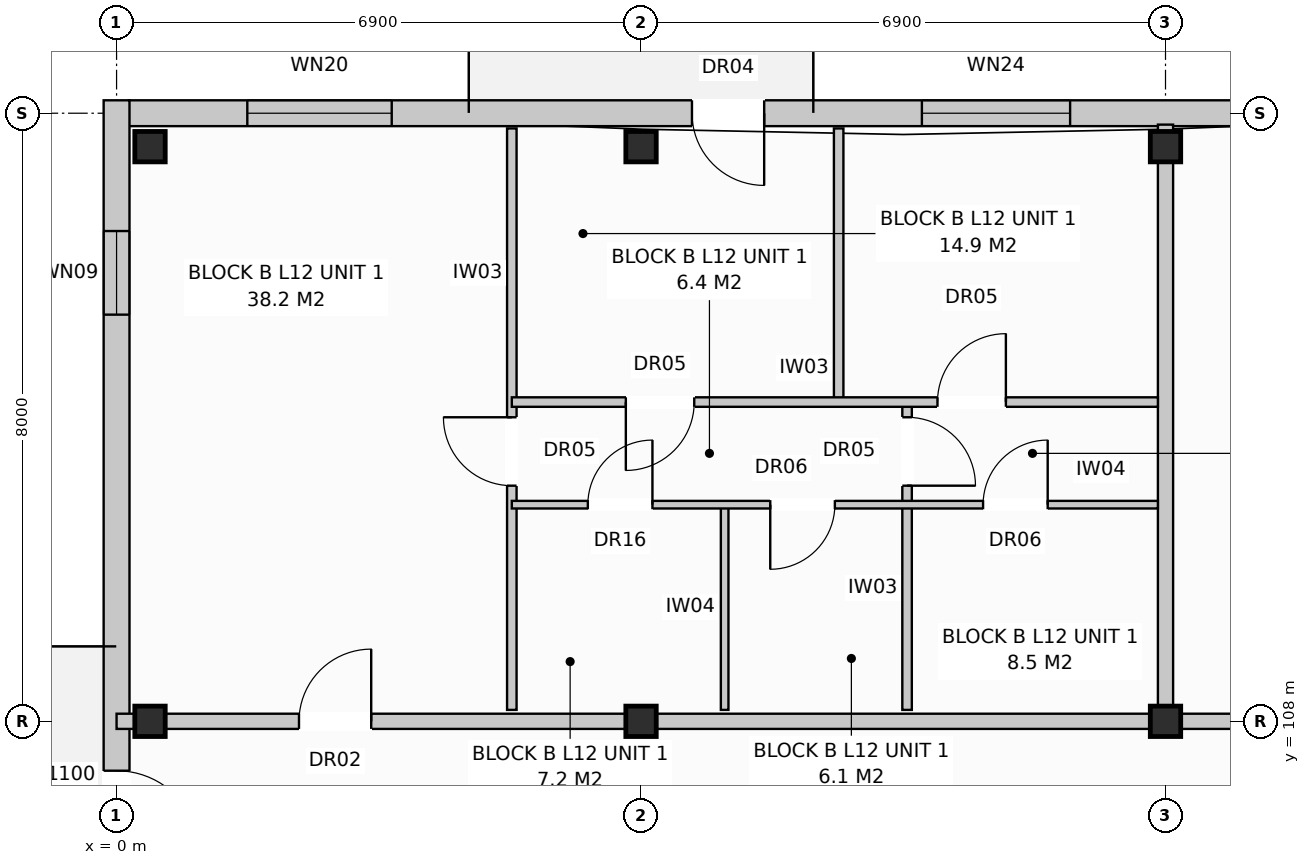
"""IFC4 building model, lengths in metres.
Left out: names, types, materials, properties, quantities, classifications, styles, units other than length and angle.
Written with IfcOpenShell. Run it as: python <this file> out.ifc"""

import sys

from ifc_helpers import new_model, si_unit, direction, frame, frame_2d, origin, origin_with_axes, origin_2d, place, context, subcontext, project, spatial, rectangle, extrude, element, fill, save


model = new_model("IFC4")
c1 = context("Model", 3, precision=1e-05, world=origin(), true_north=direction((0.0, 1.0)))
c2 = subcontext(c1, "Body", "Model", "MODEL_VIEW")
j1 = project(units=[si_unit("LENGTHUNIT", "METRE"), si_unit("PLANEANGLEUNIT", "RADIAN")], contexts=[c1])
p1 = place(None, origin())
s1 = spatial("IfcSite", under=j1, at=p1, CompositionType="ELEMENT")
p2 = place(p1, origin())
s2 = spatial("IfcBuilding", under=s1, at=p2, CompositionType="ELEMENT")
p3 = place(p2, frame((0.0, 0.0, 40.0)))
s3 = spatial("IfcBuildingStorey", under=s2, at=p3, CompositionType="ELEMENT", Elevation=40.0)
for number, where, z_axis, x_axis in (
    (1, (0.44, 108.0, 0.0), (0.0, 0.0, 1.0), (1.0, 0.0, 0.0)),
    (2, (0.44, 115.56, 0.0), (0.0, 0.0, 1.0), (1.0, 0.0, 0.0)),
    (3, (6.9, 108.0, 0.0), (0.0, 0.0, 1.0), (1.0, 0.0, 0.0)),
    (4, (6.9, 115.56, 0.0), (0.0, 0.0, 1.0), (1.0, 0.0, 0.0)),
    (5, (13.8, 108.0, 0.0), (0.0, 0.0, 1.0), (1.0, 0.0, 0.0)),
    (6, (13.8, 115.56, 0.0), (0.0, 0.0, 1.0), (1.0, 0.0, 0.0)),
):
    element("IfcColumn", number, at=place(p3, frame(where, z_axis=z_axis, x_axis=x_axis)), inside=s3, PredefinedType="COLUMN", context=c2, shape_type="SweptSolid", body=[
        extrude(rectangle(XDim=0.4, YDim=0.4, at=origin_2d()), origin(), (0.0, 0.0, 1.0), 3.2),
    ])
p4 = place(p3, frame((0.16, 116.0, 0.0), z_axis=(0.0, 0.0, 1.0), x_axis=(1.0, 0.0, 0.0)))
e7 = element("IfcWall", 7, at=p4, inside=s3, PredefinedType="STANDARD", context=c2, shape_type="SweptSolid", body=[
    extrude(rectangle(XDim=41.08, YDim=0.34, at=frame_2d((20.54, 0.0))), origin(), (0.0, 0.0, 1.0), 2.91),
])
p5 = place(p4, frame((7.41, 0.0, 0.0)))
e8 = element("IfcOpeningElement", 8, at=p5, cuts=e7, PredefinedType="OPENING", context=c2, shape_type="SweptSolid", body=[
    extrude(rectangle(XDim=0.95, YDim=2.1, at=frame_2d((0.475, 1.05))), frame((0.0, 0.182, 0.0), z_axis=(0.0, -1.0, 0.0), x_axis=(1.0, 0.0, 0.0)), (0.0, 0.0, 1.0), 0.364),
])
p6 = place(p4, frame((18.744, 0.0, 0.0)))
e9 = element("IfcOpeningElement", 9, at=p6, cuts=e7, PredefinedType="OPENING", context=c2, shape_type="SweptSolid", body=[
    extrude(rectangle(XDim=0.95, YDim=2.1, at=frame_2d((0.475, 1.05))), frame((0.0, 0.182, 0.0), z_axis=(0.0, -1.0, 0.0), x_axis=(1.0, 0.0, 0.0)), (0.0, 0.0, 1.0), 0.364),
])
p7 = place(p4, frame((32.694, 0.0, 0.0)))
e10 = element("IfcOpeningElement", 10, at=p7, cuts=e7, PredefinedType="OPENING", context=c2, shape_type="SweptSolid", body=[
    extrude(rectangle(XDim=0.95, YDim=2.1, at=frame_2d((0.475, 1.05))), frame((0.0, 0.182, 0.0), z_axis=(0.0, -1.0, 0.0), x_axis=(1.0, 0.0, 0.0)), (0.0, 0.0, 1.0), 0.364),
])
p8 = place(p4, frame((1.56, 0.0, 0.8)))
e11 = element("IfcOpeningElement", 11, at=p8, cuts=e7, PredefinedType="OPENING", context=c2, shape_type="SweptSolid", body=[
    extrude(rectangle(XDim=1.9, YDim=1.85, at=frame_2d((0.95, 0.925))), frame((0.0, 0.182, 0.0), z_axis=(0.0, -1.0, 0.0), x_axis=(1.0, 0.0, 0.0)), (0.0, 0.0, 1.0), 0.364),
])
p9 = place(p4, frame((10.435, 0.0, 0.8)))
e12 = element("IfcOpeningElement", 12, at=p9, cuts=e7, PredefinedType="OPENING", context=c2, shape_type="SweptSolid", body=[
    extrude(rectangle(XDim=1.95, YDim=1.65, at=frame_2d((0.975, 0.825))), frame((0.0, 0.182, 0.0), z_axis=(0.0, -1.0, 0.0), x_axis=(1.0, 0.0, 0.0)), (0.0, 0.0, 1.0), 0.364),
])
p10 = place(p4, frame((15.91, 0.0, 0.8)))
e13 = element("IfcOpeningElement", 13, at=p10, cuts=e7, PredefinedType="OPENING", context=c2, shape_type="SweptSolid", body=[
    extrude(rectangle(XDim=1.8, YDim=1.7, at=frame_2d((0.9, 0.85))), frame((0.0, 0.182, 0.0), z_axis=(0.0, -1.0, 0.0), x_axis=(1.0, 0.0, 0.0)), (0.0, 0.0, 1.0), 0.364),
])
p11 = place(p4, frame((21.96, 0.0, 0.72)))
e14 = element("IfcOpeningElement", 14, at=p11, cuts=e7, PredefinedType="OPENING", context=c2, shape_type="SweptSolid", body=[
    extrude(rectangle(XDim=1.1, YDim=1.5, at=frame_2d((0.55, 0.75))), frame((0.0, 0.182, 0.0), z_axis=(0.0, -1.0, 0.0), x_axis=(1.0, 0.0, 0.0)), (0.0, 0.0, 1.0), 0.364),
])
p12 = place(p4, frame((27.935, 0.0, 0.8)))
e15 = element("IfcOpeningElement", 15, at=p12, cuts=e7, PredefinedType="OPENING", context=c2, shape_type="SweptSolid", body=[
    extrude(rectangle(XDim=1.95, YDim=1.65, at=frame_2d((0.975, 0.825))), frame((0.0, 0.182, 0.0), z_axis=(0.0, -1.0, 0.0), x_axis=(1.0, 0.0, 0.0)), (0.0, 0.0, 1.0), 0.364),
])
p13 = place(p4, frame((30.81, 0.0, 0.85)))
e16 = element("IfcOpeningElement", 16, at=p13, cuts=e7, PredefinedType="OPENING", context=c2, shape_type="SweptSolid", body=[
    extrude(rectangle(XDim=1.5, YDim=1.65, at=frame_2d((0.75, 0.825))), frame((0.0, 0.182, 0.0), z_axis=(0.0, -1.0, 0.0), x_axis=(1.0, 0.0, 0.0)), (0.0, 0.0, 1.0), 0.364),
])
p14 = place(p4, frame((35.76, 0.0, 0.72)))
e17 = element("IfcOpeningElement", 17, at=p14, cuts=e7, PredefinedType="OPENING", context=c2, shape_type="SweptSolid", body=[
    extrude(rectangle(XDim=1.1, YDim=1.5, at=frame_2d((0.55, 0.75))), frame((0.0, 0.182, 0.0), z_axis=(0.0, -1.0, 0.0), x_axis=(1.0, 0.0, 0.0)), (0.0, 0.0, 1.0), 0.364),
])
p15 = place(p4, frame((38.525, 0.0, 0.8)))
e18 = element("IfcOpeningElement", 18, at=p15, cuts=e7, PredefinedType="OPENING", context=c2, shape_type="SweptSolid", body=[
    extrude(rectangle(XDim=1.95, YDim=1.65, at=frame_2d((0.975, 0.825))), frame((0.0, 0.182, 0.0), z_axis=(0.0, -1.0, 0.0), x_axis=(1.0, 0.0, 0.0)), (0.0, 0.0, 1.0), 0.364),
])
p16 = place(p3, frame((0.0, 97.43, 0.0), z_axis=(0.0, 0.0, 1.0), x_axis=(0.0, 1.0, 0.0)))
e19 = element("IfcWall", 19, at=p16, inside=s3, PredefinedType="STANDARD", context=c2, shape_type="SweptSolid", body=[
    extrude(rectangle(XDim=18.74, YDim=0.34, at=frame_2d((9.37, 0.0))), origin(), (0.0, 0.0, 1.0), 2.91),
])
p17 = place(p16, frame((8.82, 0.0, 0.0)))
e20 = element("IfcOpeningElement", 20, at=p17, cuts=e19, PredefinedType="OPENING", context=c2, shape_type="SweptSolid", body=[
    extrude(rectangle(XDim=1.1, YDim=2.1, at=frame_2d((0.55, 1.05))), frame((0.0, 0.182, 0.0), z_axis=(0.0, -1.0, 0.0), x_axis=(1.0, 0.0, 0.0)), (0.0, 0.0, 1.0), 0.364),
])
p18 = place(p16, frame((1.72, 0.0, 0.72)))
e21 = element("IfcOpeningElement", 21, at=p18, cuts=e19, PredefinedType="OPENING", context=c2, shape_type="SweptSolid", body=[
    extrude(rectangle(XDim=1.1, YDim=1.5, at=frame_2d((0.55, 0.75))), frame((0.0, 0.182, 0.0), z_axis=(0.0, -1.0, 0.0), x_axis=(1.0, 0.0, 0.0)), (0.0, 0.0, 1.0), 0.364),
])
p19 = place(p16, frame((15.92, 0.0, 0.72)))
e22 = element("IfcOpeningElement", 22, at=p19, cuts=e19, PredefinedType="OPENING", context=c2, shape_type="SweptSolid", body=[
    extrude(rectangle(XDim=1.1, YDim=1.5, at=frame_2d((0.55, 0.75))), frame((0.0, 0.182, 0.0), z_axis=(0.0, -1.0, 0.0), x_axis=(1.0, 0.0, 0.0)), (0.0, 0.0, 1.0), 0.364),
])
p20 = place(p3, frame((13.8, 108.15, 0.0), z_axis=(0.0, 0.0, 1.0), x_axis=(0.0, 1.0, 0.0)))
e23 = element("IfcWall", 23, at=p20, inside=s3, PredefinedType="PARTITIONING", context=c2, shape_type="SweptSolid", body=[
    extrude(rectangle(XDim=7.7, YDim=0.2, at=frame_2d((3.85, 0.0))), origin(), (0.0, 0.0, 1.0), 2.97),
])
p21 = place(p3, frame((0.0, 108.0, 0.0), z_axis=(0.0, 0.0, 1.0), x_axis=(1.0, 0.0, 0.0)))
e24 = element("IfcWall", 24, at=p21, inside=s3, PredefinedType="PARTITIONING", context=c2, shape_type="SweptSolid", body=[
    extrude(rectangle(XDim=13.8, YDim=0.2, at=frame_2d((6.9, 0.0))), origin(), (0.0, 0.0, 1.0), 2.35),
])
p22 = place(p21, frame((2.4, 0.0, 0.0)))
e25 = element("IfcOpeningElement", 25, at=p22, cuts=e24, PredefinedType="OPENING", context=c2, shape_type="SweptSolid", body=[
    extrude(rectangle(XDim=0.95, YDim=2.15, at=frame_2d((0.475, 1.075))), frame((0.0, 0.112, 0.0), z_axis=(0.0, -1.0, 0.0), x_axis=(1.0, 0.0, 0.0)), (0.0, 0.0, 1.0), 0.224),
])
p23 = place(p3, frame((5.2, 108.15, 0.0), z_axis=(0.0, 0.0, 1.0), x_axis=(0.0, 1.0, 0.0)))
e26 = element("IfcWall", 26, at=p23, inside=s3, PredefinedType="PARTITIONING", context=c2, shape_type="SweptSolid", body=[
    extrude(rectangle(XDim=7.65, YDim=0.125, at=frame_2d((3.825, 0.0))), origin(), (0.0, 0.0, 1.0), 2.97),
])
p24 = place(p23, frame((2.95, 0.0, 0.0)))
e27 = element("IfcOpeningElement", 27, at=p24, cuts=e26, PredefinedType="OPENING", context=c2, shape_type="SweptSolid", body=[
    extrude(rectangle(XDim=0.9, YDim=2.1, at=frame_2d((0.45, 1.05))), frame((0.0, 0.074, 0.0), z_axis=(0.0, -1.0, 0.0), x_axis=(1.0, 0.0, 0.0)), (0.0, 0.0, 1.0), 0.149),
])
p25 = place(p3, frame((8.0, 108.15, 0.0), z_axis=(0.0, 0.0, 1.0), x_axis=(0.0, 1.0, 0.0)))
e28 = element("IfcWall", 28, at=p25, inside=s3, PredefinedType="PARTITIONING", context=c2, shape_type="SweptSolid", body=[
    extrude(rectangle(XDim=2.7, YDim=0.1, at=frame_2d((1.35, 0.0))), origin(), (0.0, 0.0, 1.0), 2.59),
])
p26 = place(p3, frame((10.4, 108.15, 0.0), z_axis=(0.0, 0.0, 1.0), x_axis=(0.0, 1.0, 0.0)))
e29 = element("IfcWall", 29, at=p26, inside=s3, PredefinedType="PARTITIONING", context=c2, shape_type="SweptSolid", body=[
    extrude(rectangle(XDim=4.05, YDim=0.125, at=frame_2d((2.025, 0.0))), origin(), (0.0, 0.0, 1.0), 2.97),
])
p27 = place(p26, frame((2.95, 0.0, 0.0)))
e30 = element("IfcOpeningElement", 30, at=p27, cuts=e29, PredefinedType="OPENING", context=c2, shape_type="SweptSolid", body=[
    extrude(rectangle(XDim=0.9, YDim=2.1, at=frame_2d((0.45, 1.05))), frame((0.0, 0.074, 0.0), z_axis=(0.0, -1.0, 0.0), x_axis=(1.0, 0.0, 0.0)), (0.0, 0.0, 1.0), 0.149),
])
p28 = place(p3, frame((9.5, 112.2, 0.0), z_axis=(0.0, 0.0, 1.0), x_axis=(0.0, 1.0, 0.0)))
e31 = element("IfcWall", 31, at=p28, inside=s3, PredefinedType="PARTITIONING", context=c2, shape_type="SweptSolid", body=[
    extrude(rectangle(XDim=3.6, YDim=0.125, at=frame_2d((1.8, 0.0))), origin(), (0.0, 0.0, 1.0), 2.97),
])
p29 = place(p3, frame((5.2, 110.85, 0.0), z_axis=(0.0, 0.0, 1.0), x_axis=(1.0, 0.0, 0.0)))
e32 = element("IfcWall", 32, at=p29, inside=s3, PredefinedType="PARTITIONING", context=c2, shape_type="SweptSolid", body=[
    extrude(rectangle(XDim=8.5, YDim=0.1, at=frame_2d((4.25, 0.0))), origin(), (0.0, 0.0, 1.0), 2.97),
])
p30 = place(p29, frame((1.0, 0.0, 0.0)))
e33 = element("IfcOpeningElement", 33, at=p30, cuts=e32, PredefinedType="OPENING", context=c2, shape_type="SweptSolid", body=[
    extrude(rectangle(XDim=0.85, YDim=2.1, at=frame_2d((0.425, 1.05))), frame((0.0, 0.062, 0.0), z_axis=(0.0, -1.0, 0.0), x_axis=(1.0, 0.0, 0.0)), (0.0, 0.0, 1.0), 0.124),
])
p31 = place(p29, frame((3.4, 0.0, 0.0)))
e34 = element("IfcOpeningElement", 34, at=p31, cuts=e32, PredefinedType="OPENING", context=c2, shape_type="SweptSolid", body=[
    extrude(rectangle(XDim=0.85, YDim=2.05, at=frame_2d((0.425, 1.025))), frame((0.0, 0.062, 0.0), z_axis=(0.0, -1.0, 0.0), x_axis=(1.0, 0.0, 0.0)), (0.0, 0.0, 1.0), 0.124),
])
p32 = place(p29, frame((6.2, 0.0, 0.0)))
e35 = element("IfcOpeningElement", 35, at=p32, cuts=e32, PredefinedType="OPENING", context=c2, shape_type="SweptSolid", body=[
    extrude(rectangle(XDim=0.85, YDim=2.05, at=frame_2d((0.425, 1.025))), frame((0.0, 0.062, 0.0), z_axis=(0.0, -1.0, 0.0), x_axis=(1.0, 0.0, 0.0)), (0.0, 0.0, 1.0), 0.124),
])
p33 = place(p3, frame((5.2, 112.2, 0.0), z_axis=(0.0, 0.0, 1.0), x_axis=(1.0, 0.0, 0.0)))
e36 = element("IfcWall", 36, at=p33, inside=s3, PredefinedType="PARTITIONING", context=c2, shape_type="SweptSolid", body=[
    extrude(rectangle(XDim=8.5, YDim=0.125, at=frame_2d((4.25, 0.0))), origin(), (0.0, 0.0, 1.0), 2.97),
])
p34 = place(p33, frame((1.5, 0.0, 0.0)))
e37 = element("IfcOpeningElement", 37, at=p34, cuts=e36, PredefinedType="OPENING", context=c2, shape_type="SweptSolid", body=[
    extrude(rectangle(XDim=0.9, YDim=2.1, at=frame_2d((0.45, 1.05))), frame((0.0, 0.074, 0.0), z_axis=(0.0, -1.0, 0.0), x_axis=(1.0, 0.0, 0.0)), (0.0, 0.0, 1.0), 0.149),
])
p35 = place(p33, frame((5.6, 0.0, 0.0)))
e38 = element("IfcOpeningElement", 38, at=p35, cuts=e36, PredefinedType="OPENING", context=c2, shape_type="SweptSolid", body=[
    extrude(rectangle(XDim=0.9, YDim=2.1, at=frame_2d((0.45, 1.05))), frame((0.0, 0.074, 0.0), z_axis=(0.0, -1.0, 0.0), x_axis=(1.0, 0.0, 0.0)), (0.0, 0.0, 1.0), 0.149),
])
p36 = place(p3, frame((13.8, 108.0, 0.0), z_axis=(0.0, 0.0, 1.0), x_axis=(1.0, 0.0, 0.0)))
e39 = element("IfcWall", 39, at=p36, inside=s3, PredefinedType="PARTITIONING", context=c2, shape_type="SweptSolid", body=[
    extrude(rectangle(XDim=20.7, YDim=0.2, at=frame_2d((10.35, 0.0))), origin(), (0.0, 0.0, 1.0), 2.35),
])
p37 = place(p36, frame((2.4, 0.0, 0.0)))
e40 = element("IfcOpeningElement", 40, at=p37, cuts=e39, PredefinedType="OPENING", context=c2, shape_type="SweptSolid", body=[
    extrude(rectangle(XDim=0.95, YDim=2.15, at=frame_2d((0.475, 1.075))), frame((0.0, 0.112, 0.0), z_axis=(0.0, -1.0, 0.0), x_axis=(1.0, 0.0, 0.0)), (0.0, 0.0, 1.0), 0.224),
])
p38 = place(p5, frame((0.95, 0.0, 0.0), z_axis=(0.0, 0.0, 1.0), x_axis=(-1.0, 0.0, 0.0)))
e41 = element("IfcDoor", 41, at=p38, inside=s3, OperationType="SINGLE_SWING_RIGHT", PredefinedType="DOOR", context=c2, shape_type="SweptSolid", body=[
    extrude(rectangle(XDim=0.95, YDim=2.1, at=frame_2d((0.475, 1.05))), frame((0.0, 0.025, 0.0), z_axis=(0.0, -1.0, 0.0), x_axis=(1.0, 0.0, 0.0)), (0.0, 0.0, 1.0), 0.05),
])
fill(e8, e41)
p39 = place(p8, origin_with_axes())
e42 = element("IfcWindow", 42, at=p39, inside=s3, PartitioningType="SINGLE_PANEL", PredefinedType="WINDOW", context=c2, shape_type="SweptSolid", body=[
    extrude(rectangle(XDim=1.9, YDim=1.85, at=frame_2d((0.95, 0.925))), frame((0.0, 0.03, 0.0), z_axis=(0.0, -1.0, 0.0), x_axis=(1.0, 0.0, 0.0)), (0.0, 0.0, 1.0), 0.06),
])
fill(e11, e42)
p40 = place(p9, origin_with_axes())
e43 = element("IfcWindow", 43, at=p40, inside=s3, PartitioningType="SINGLE_PANEL", PredefinedType="WINDOW", context=c2, shape_type="SweptSolid", body=[
    extrude(rectangle(XDim=1.95, YDim=1.65, at=frame_2d((0.975, 0.825))), frame((0.0, 0.03, 0.0), z_axis=(0.0, -1.0, 0.0), x_axis=(1.0, 0.0, 0.0)), (0.0, 0.0, 1.0), 0.06),
])
fill(e12, e43)
p41 = place(p17, frame((1.1, 0.0, 0.0), z_axis=(0.0, 0.0, 1.0), x_axis=(-1.0, 0.0, 0.0)))
e44 = element("IfcDoor", 44, at=p41, inside=s3, OperationType="SINGLE_SWING_LEFT", PredefinedType="DOOR", context=c2, shape_type="SweptSolid", body=[
    extrude(rectangle(XDim=1.1, YDim=2.1, at=frame_2d((0.55, 1.05))), frame((0.0, 0.025, 0.0), z_axis=(0.0, -1.0, 0.0), x_axis=(1.0, 0.0, 0.0)), (0.0, 0.0, 1.0), 0.05),
])
fill(e20, e44)
p42 = place(p19, origin_with_axes())
e45 = element("IfcWindow", 45, at=p42, inside=s3, PartitioningType="SINGLE_PANEL", PredefinedType="WINDOW", context=c2, shape_type="SweptSolid", body=[
    extrude(rectangle(XDim=1.1, YDim=1.5, at=frame_2d((0.55, 0.75))), frame((0.0, 0.03, 0.0), z_axis=(0.0, -1.0, 0.0), x_axis=(1.0, 0.0, 0.0)), (0.0, 0.0, 1.0), 0.06),
])
fill(e22, e45)
p43 = place(p22, origin_with_axes())
e46 = element("IfcDoor", 46, at=p43, inside=s3, OperationType="SINGLE_SWING_RIGHT", PredefinedType="DOOR", context=c2, shape_type="SweptSolid", body=[
    extrude(rectangle(XDim=0.95, YDim=2.15, at=frame_2d((0.475, 1.075))), frame((0.0, 0.025, 0.0), z_axis=(0.0, -1.0, 0.0), x_axis=(1.0, 0.0, 0.0)), (0.0, 0.0, 1.0), 0.05),
])
fill(e25, e46)
p44 = place(p24, origin_with_axes())
e47 = element("IfcDoor", 47, at=p44, inside=s3, OperationType="SINGLE_SWING_RIGHT", PredefinedType="DOOR", context=c2, shape_type="SweptSolid", body=[
    extrude(rectangle(XDim=0.9, YDim=2.1, at=frame_2d((0.45, 1.05))), frame((0.0, 0.025, 0.0), z_axis=(0.0, -1.0, 0.0), x_axis=(1.0, 0.0, 0.0)), (0.0, 0.0, 1.0), 0.05),
])
fill(e27, e47)
p45 = place(p27, frame((0.9, 0.0, 0.0), z_axis=(0.0, 0.0, 1.0), x_axis=(-1.0, 0.0, 0.0)))
e48 = element("IfcDoor", 48, at=p45, inside=s3, OperationType="SINGLE_SWING_LEFT", PredefinedType="DOOR", context=c2, shape_type="SweptSolid", body=[
    extrude(rectangle(XDim=0.9, YDim=2.1, at=frame_2d((0.45, 1.05))), frame((0.0, 0.025, 0.0), z_axis=(0.0, -1.0, 0.0), x_axis=(1.0, 0.0, 0.0)), (0.0, 0.0, 1.0), 0.05),
])
fill(e30, e48)
p46 = place(p30, origin_with_axes())
e49 = element("IfcDoor", 49, at=p46, inside=s3, OperationType="SINGLE_SWING_RIGHT", PredefinedType="DOOR", context=c2, shape_type="SweptSolid", body=[
    extrude(rectangle(XDim=0.85, YDim=2.1, at=frame_2d((0.425, 1.05))), frame((0.0, 0.025, 0.0), z_axis=(0.0, -1.0, 0.0), x_axis=(1.0, 0.0, 0.0)), (0.0, 0.0, 1.0), 0.05),
])
fill(e33, e49)
p47 = place(p31, frame((0.85, 0.0, 0.0), z_axis=(0.0, 0.0, 1.0), x_axis=(-1.0, 0.0, 0.0)))
e50 = element("IfcDoor", 50, at=p47, inside=s3, OperationType="SINGLE_SWING_LEFT", PredefinedType="DOOR", context=c2, shape_type="SweptSolid", body=[
    extrude(rectangle(XDim=0.85, YDim=2.05, at=frame_2d((0.425, 1.025))), frame((0.0, 0.025, 0.0), z_axis=(0.0, -1.0, 0.0), x_axis=(1.0, 0.0, 0.0)), (0.0, 0.0, 1.0), 0.05),
])
fill(e34, e50)
p48 = place(p32, origin_with_axes())
e51 = element("IfcDoor", 51, at=p48, inside=s3, OperationType="SINGLE_SWING_RIGHT", PredefinedType="DOOR", context=c2, shape_type="SweptSolid", body=[
    extrude(rectangle(XDim=0.85, YDim=2.05, at=frame_2d((0.425, 1.025))), frame((0.0, 0.025, 0.0), z_axis=(0.0, -1.0, 0.0), x_axis=(1.0, 0.0, 0.0)), (0.0, 0.0, 1.0), 0.05),
])
fill(e35, e51)
p49 = place(p34, frame((0.9, 0.0, 0.0), z_axis=(0.0, 0.0, 1.0), x_axis=(-1.0, 0.0, 0.0)))
e52 = element("IfcDoor", 52, at=p49, inside=s3, OperationType="SINGLE_SWING_LEFT", PredefinedType="DOOR", context=c2, shape_type="SweptSolid", body=[
    extrude(rectangle(XDim=0.9, YDim=2.1, at=frame_2d((0.45, 1.05))), frame((0.0, 0.025, 0.0), z_axis=(0.0, -1.0, 0.0), x_axis=(1.0, 0.0, 0.0)), (0.0, 0.0, 1.0), 0.05),
])
fill(e37, e52)
p50 = place(p35, origin_with_axes())
e53 = element("IfcDoor", 53, at=p50, inside=s3, OperationType="SINGLE_SWING_RIGHT", PredefinedType="DOOR", context=c2, shape_type="SweptSolid", body=[
    extrude(rectangle(XDim=0.9, YDim=2.1, at=frame_2d((0.45, 1.05))), frame((0.0, 0.025, 0.0), z_axis=(0.0, -1.0, 0.0), x_axis=(1.0, 0.0, 0.0)), (0.0, 0.0, 1.0), 0.05),
])
fill(e38, e53)
save(model, sys.argv[1])
